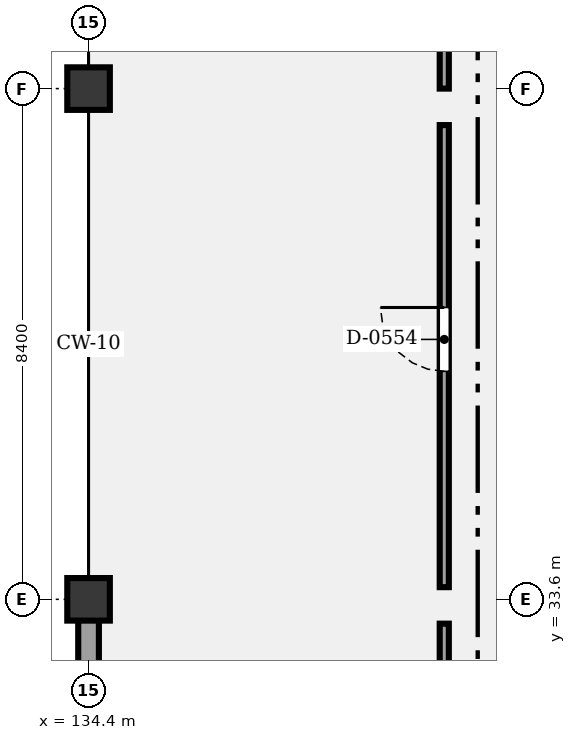
"""IFC4 building model, lengths in metres.
Left out: names, types, materials, properties, quantities, classifications, styles, units other than length and angle.
Written with IfcOpenShell. Run it as: python <this file> out.ifc"""

import sys

from ifc_helpers import new_model, si_unit, direction, frame, frame_2d, origin, origin_2d, place, context, subcontext, project, spatial, rectangle, extrude, element, fill, save


model = new_model("IFC4")
c1 = context("Model", 3, precision=1e-05, world=origin(), true_north=direction((0.0, 1.0)))
c2 = subcontext(c1, "Body", "Model", "MODEL_VIEW")
j1 = project(units=[si_unit("LENGTHUNIT", "METRE"), si_unit("PLANEANGLEUNIT", "RADIAN")], contexts=[c1])
p1 = place(None, origin())
s1 = spatial("IfcSite", under=j1, at=p1, CompositionType="ELEMENT")
p2 = place(p1, origin())
s2 = spatial("IfcBuilding", under=s1, at=p2, CompositionType="ELEMENT")
p3 = place(p2, frame((0.0, 0.0, 17.8)))
s3 = spatial("IfcBuildingStorey", under=s2, at=p3, CompositionType="ELEMENT", Elevation=17.8)
for number, where, z_axis, x_axis in (
    (1, (134.4, 33.6, 0.0), (0.0, 0.0, 1.0), (1.0, 0.0, 0.0)),
    (2, (134.4, 42.0, 0.0), (0.0, 0.0, 1.0), (1.0, 0.0, 0.0)),
):
    element("IfcColumn", number, at=place(p3, frame(where, z_axis=z_axis, x_axis=x_axis)), inside=s3, PredefinedType="COLUMN", context=c2, shape_type="SweptSolid", body=[
        extrude(rectangle(XDim=0.7, YDim=0.7, at=origin_2d()), origin(), (0.0, 0.0, 1.0), 4.2),
    ])
p4 = place(p3, frame((134.4, 16.8, 0.0), z_axis=(0.0, 0.0, 1.0), x_axis=(0.0, 1.0, 0.0)))
e3 = element("IfcWall", 3, at=p4, inside=s3, PredefinedType="SOLIDWALL", context=c2, shape_type="SweptSolid", body=[
    extrude(rectangle(XDim=16.8, YDim=0.34, at=frame_2d((8.4, 0.0))), origin(), (0.0, 0.0, 1.0), 3.39),
])
p5 = place(p4, frame((3.54, 0.0, 0.85)))
e4 = element("IfcOpeningElement", 4, at=p5, cuts=e3, PredefinedType="OPENING", context=c2, shape_type="SweptSolid", body=[
    extrude(rectangle(XDim=2.05, YDim=1.4, at=frame_2d((1.025, 0.7))), frame((0.0, 0.18, 0.0), z_axis=(0.0, -1.0, 0.0), x_axis=(1.0, 0.0, 0.0)), (0.0, 0.0, 1.0), 0.36),
])
p6 = place(p3, frame((140.25, 25.6, 0.0), z_axis=(0.0, 0.0, 1.0), x_axis=(0.0, 1.0, 0.0)))
e5 = element("IfcWall", 5, at=p6, inside=s3, PredefinedType="PARTITIONING", context=c2, shape_type="SweptSolid", body=[
    extrude(rectangle(XDim=7.6, YDim=0.15, at=frame_2d((3.8, 0.0))), origin(), (0.0, 0.0, 1.0), 3.3),
])
p7 = place(p6, frame((3.2, 0.0, 0.0)))
e6 = element("IfcOpeningElement", 6, at=p7, cuts=e5, PredefinedType="OPENING", context=c2, shape_type="SweptSolid", body=[
    extrude(rectangle(XDim=1.05, YDim=2.1, at=frame_2d((0.525, 1.05))), frame((0.0, 0.085, 0.0), z_axis=(0.0, -1.0, 0.0), x_axis=(1.0, 0.0, 0.0)), (0.0, 0.0, 1.0), 0.17),
])
p8 = place(p3, frame((140.25, 33.8, 0.0), z_axis=(0.0, 0.0, 1.0), x_axis=(0.0, 1.0, 0.0)))
e7 = element("IfcWall", 7, at=p8, inside=s3, PredefinedType="PARTITIONING", context=c2, shape_type="SweptSolid", body=[
    extrude(rectangle(XDim=7.6, YDim=0.15, at=frame_2d((3.8, 0.0))), origin(), (0.0, 0.0, 1.0), 3.3),
])
p9 = place(p8, frame((3.55, 0.0, 0.0)))
e8 = element("IfcOpeningElement", 8, at=p9, cuts=e7, PredefinedType="OPENING", context=c2, shape_type="SweptSolid", body=[
    extrude(rectangle(XDim=1.05, YDim=2.1, at=frame_2d((0.525, 1.05))), frame((0.0, 0.085, 0.0), z_axis=(0.0, -1.0, 0.0), x_axis=(1.0, 0.0, 0.0)), (0.0, 0.0, 1.0), 0.17),
])
p10 = place(p3, frame((140.25, 42.0, 0.0), z_axis=(0.0, 0.0, 1.0), x_axis=(0.0, 1.0, 0.0)))
e9 = element("IfcWall", 9, at=p10, inside=s3, PredefinedType="PARTITIONING", context=c2, shape_type="SweptSolid", body=[
    extrude(rectangle(XDim=7.6, YDim=0.15, at=frame_2d((3.8, 0.0))), origin(), (0.0, 0.0, 1.0), 3.3),
])
p11 = place(p10, frame((3.55, 0.0, 0.0)))
e10 = element("IfcOpeningElement", 10, at=p11, cuts=e9, PredefinedType="OPENING", context=c2, shape_type="SweptSolid", body=[
    extrude(rectangle(XDim=1.05, YDim=2.1, at=frame_2d((0.525, 1.05))), frame((0.0, 0.085, 0.0), z_axis=(0.0, -1.0, 0.0), x_axis=(1.0, 0.0, 0.0)), (0.0, 0.0, 1.0), 0.17),
])
p12 = place(p9, origin())
e11 = element("IfcDoor", 11, at=p12, inside=s3, OperationType="SINGLE_SWING_RIGHT", PredefinedType="DOOR", context=c2, shape_type="SweptSolid", body=[
    extrude(rectangle(XDim=1.05, YDim=2.1, at=frame_2d((0.525, 1.05))), frame((0.0, 0.025, 0.0), z_axis=(0.0, -1.0, 0.0), x_axis=(1.0, 0.0, 0.0)), (0.0, 0.0, 1.0), 0.05),
])
fill(e8, e11)
save(model, sys.argv[1])
